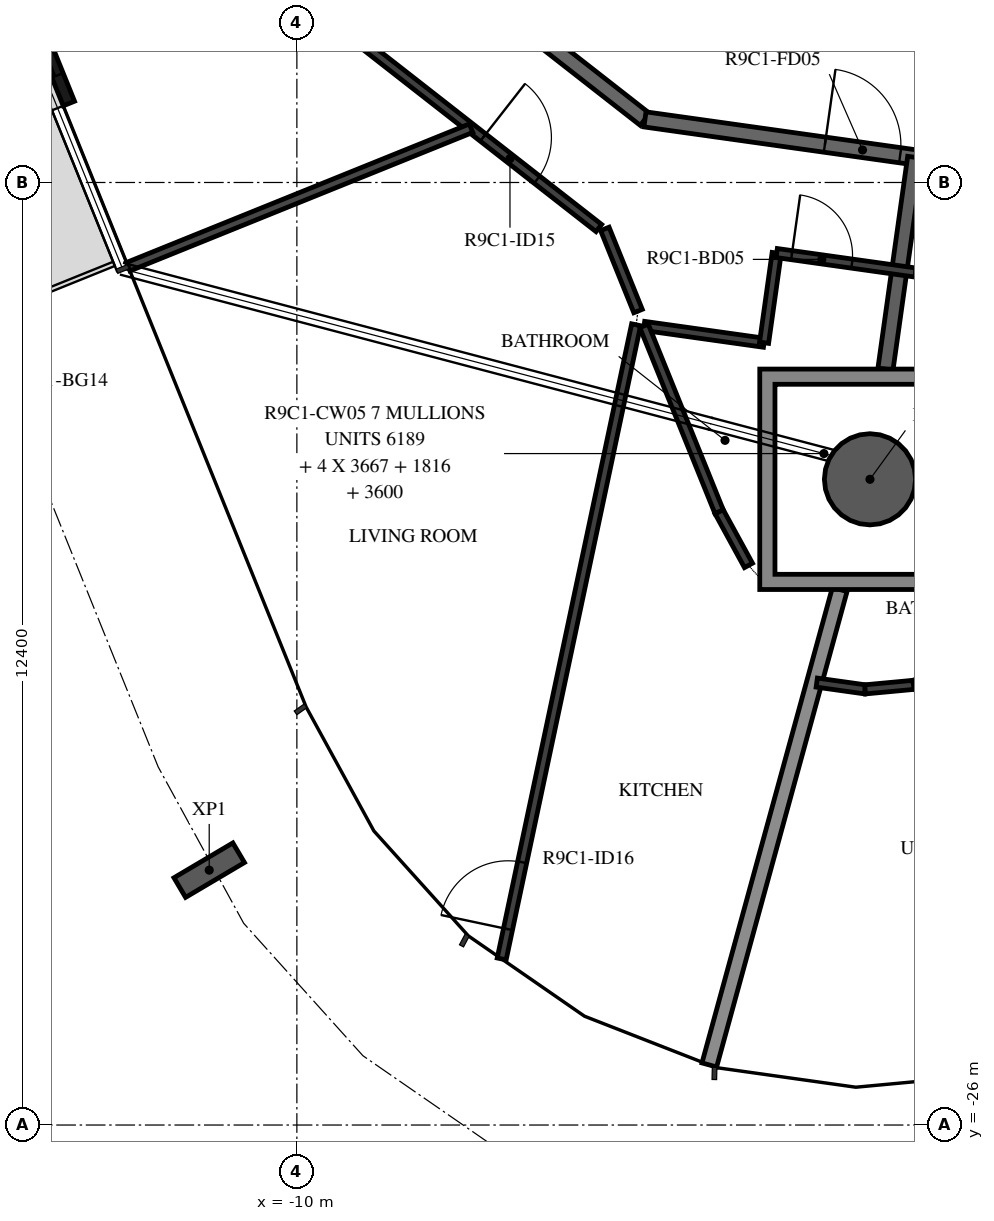
"""IFC4 building model, lengths in metres.
Left out: names, types, materials, properties, quantities, classifications, styles, units other than length and angle.
Written with IfcOpenShell. Run it as: python <this file> out.ifc"""

import sys

from ifc_helpers import new_model, si_unit, direction, frame, frame_2d, origin, origin_2d, place, context, subcontext, project, spatial, polyline, rectangle, hollow_circle, i_section, outline, extrude, element, fill, save


model = new_model("IFC4")
c1 = context("Model", 3, precision=1e-05, world=origin(), true_north=direction((0.0, 1.0)))
c2 = subcontext(c1, "Body", "Model", "MODEL_VIEW")
j1 = project(units=[si_unit("LENGTHUNIT", "METRE"), si_unit("PLANEANGLEUNIT", "RADIAN")], contexts=[c1])
p1 = place(None, origin())
s1 = spatial("IfcSite", under=j1, at=p1, CompositionType="ELEMENT")
p2 = place(p1, origin())
s2 = spatial("IfcBuilding", under=s1, at=p2, CompositionType="ELEMENT")
p3 = place(p2, frame((0.0, 0.0, 357.5)))
s3 = spatial("IfcBuildingStorey", under=s2, at=p3, CompositionType="ELEMENT", Elevation=357.5)
p4 = place(p3, frame((-2.46, -17.505, -0.38), z_axis=(0.0, 0.0, 1.0), x_axis=(1.0, 0.0, 0.0)))
e1 = element("IfcColumn", 1, at=p4, inside=s3, PredefinedType="COLUMN", context=c2, shape_type="SweptSolid", body=[
    extrude(hollow_circle(Radius=0.6, WallThickness=0.03, at=origin_2d()), origin(), (0.0, 0.0, 1.0), 3.5),
])
p5 = place(p3, frame((-11.153, -22.647, -0.38), z_axis=(0.0, 0.0, 1.0), x_axis=(-0.509114042361, 0.86069907161, 0.0)))
e2 = element("IfcColumn", 2, at=p5, inside=s3, PredefinedType="COLUMN", context=c2, shape_type="SweptSolid", body=[
    extrude(i_section(OverallWidth=0.3, OverallDepth=0.9, WebThickness=0.019, FlangeThickness=0.035, FilletRadius=0.03, at=origin_2d()), origin(), (0.0, 0.0, 1.0), 3.5),
])
p6 = place(p3, frame((-14.198, -9.594, 0.0), z_axis=(0.0, 0.0, 1.0), x_axis=(0.374624519695, -0.927176611678, 0.0)))
e3 = element("IfcWall", 3, at=p6, inside=s3, PredefinedType="STANDARD", context=c2, shape_type="SweptSolid", body=[
    extrude(rectangle(XDim=3.2, YDim=0.16, at=frame_2d((1.6, 0.0))), origin(), (0.0, 0.0, 1.0), 3.12),
])
p7 = place(p6, frame((0.4, 0.0, 0.0)))
e4 = element("IfcOpeningElement", 4, at=p7, cuts=e3, PredefinedType="OPENING", context=c2, shape_type="SweptSolid", body=[
    extrude(rectangle(XDim=2.4, YDim=2.4, at=frame_2d((1.2, 1.2))), frame((0.0, 0.09, 0.0), z_axis=(0.0, -1.0, 0.0), x_axis=(1.0, 0.0, 0.0)), (0.0, 0.0, 1.0), 0.18),
])
p8 = place(p3, frame((-11.079, -8.349, 0.0), z_axis=(0.0, 0.0, 1.0), x_axis=(0.78800478687, -0.615669112324, 0.0)))
e5 = element("IfcWall", 5, at=p8, inside=s3, PredefinedType="STANDARD", context=c2, shape_type="SweptSolid", body=[
    extrude(rectangle(XDim=7.181, YDim=0.2, at=frame_2d((3.591, 0.0))), origin(), (0.0, 0.0, 1.0), 3.12),
])
p9 = place(p3, frame((-5.42, -12.77, 0.0), z_axis=(0.0, 0.0, 1.0), x_axis=(0.990270565508, -0.139155334385, 0.0)))
e6 = element("IfcWall", 6, at=p9, inside=s3, PredefinedType="STANDARD", context=c2, shape_type="SweptSolid", body=[
    extrude(rectangle(XDim=7.181, YDim=0.2, at=frame_2d((3.59, 0.0))), origin(), (0.0, 0.0, 1.0), 3.12),
])
p10 = place(p9, frame((2.39, 0.0, 0.0)))
e7 = element("IfcOpeningElement", 7, at=p10, cuts=e6, PredefinedType="OPENING", context=c2, shape_type="SweptSolid", body=[
    extrude(rectangle(XDim=1.0, YDim=2.1, at=frame_2d((0.5, 1.05))), frame((0.0, 0.11, 0.0), z_axis=(0.0, -1.0, 0.0), x_axis=(1.0, 0.0, 0.0)), (0.0, 0.0, 1.0), 0.22),
])
p11 = place(p9, frame((4.091, 0.0, 0.0)))
e8 = element("IfcOpeningElement", 8, at=p11, cuts=e6, PredefinedType="OPENING", context=c2, shape_type="SweptSolid", body=[
    extrude(rectangle(XDim=1.0, YDim=2.1, at=frame_2d((0.5, 1.05))), frame((0.0, 0.11, 0.0), z_axis=(0.0, -1.0, 0.0), x_axis=(1.0, 0.0, 0.0)), (0.0, 0.0, 1.0), 0.22),
])
p12 = place(p3, frame((-2.256, -16.055, 0.0), z_axis=(0.0, 0.0, 1.0), x_axis=(0.139148428478, 0.990271535919, 0.0)))
e9 = element("IfcWall", 9, at=p12, inside=s3, PredefinedType="STANDARD", context=c2, shape_type="SweptSolid", body=[
    extrude(rectangle(XDim=2.812, YDim=0.2, at=frame_2d((1.406, 0.0))), origin(), (0.0, 0.0, 1.0), 3.12),
])
p13 = place(p3, frame((-4.574, -25.21, 0.0), z_axis=(0.0, 0.0, 1.0), x_axis=(0.264579024648, 0.964364007892, 0.0)))
e10 = element("IfcWall", 10, at=p13, inside=s3, PredefinedType="STANDARD", context=c2, shape_type="SweptSolid", body=[
    extrude(rectangle(XDim=6.486, YDim=0.2, at=frame_2d((3.243, 0.0))), origin(), (0.0, 0.0, 1.0), 2.73),
])
p14 = place(p3, frame((-12.319, -9.283, 0.0), z_axis=(0.0, 0.0, 1.0), x_axis=(0.788000268464, -0.61567489546, 0.0)))
e11 = element("IfcWall", 11, at=p14, inside=s3, PredefinedType="PARTITIONING", context=c2, shape_type="SweptSolid", body=[
    extrude(rectangle(XDim=7.985, YDim=0.12, at=frame_2d((3.992, 0.0))), origin(), (0.0, 0.0, 1.0), 3.12),
])
p15 = place(p14, frame((6.051, 0.0, 0.0)))
e12 = element("IfcOpeningElement", 12, at=p15, cuts=e11, PredefinedType="OPENING", context=c2, shape_type="SweptSolid", body=[
    extrude(rectangle(XDim=0.9, YDim=2.1, at=frame_2d((0.45, 1.05))), frame((0.0, 0.07, 0.0), z_axis=(0.0, -1.0, 0.0), x_axis=(1.0, 0.0, 0.0)), (0.0, 0.0, 1.0), 0.14),
])
p16 = place(p3, frame((-5.948, -14.21, 0.0), z_axis=(0.0, 0.0, 1.0), x_axis=(0.374601530156, -0.927185900241, 0.0)))
e13 = element("IfcWall", 13, at=p16, inside=s3, PredefinedType="PARTITIONING", context=c2, shape_type="SweptSolid", body=[
    extrude(rectangle(XDim=1.166, YDim=0.12, at=frame_2d((0.583, 0.0))), origin(), (0.0, 0.0, 1.0), 3.12),
])
p17 = place(p3, frame((-5.433, -15.487, 0.0), z_axis=(0.0, 0.0, 1.0), x_axis=(0.990268451053, -0.139170380644, 0.0)))
e14 = element("IfcWall", 14, at=p17, inside=s3, PredefinedType="PARTITIONING", context=c2, shape_type="SweptSolid", body=[
    extrude(rectangle(XDim=1.595, YDim=0.12, at=frame_2d((0.797, 0.0))), origin(), (0.0, 0.0, 1.0), 3.12),
])
p18 = place(p3, frame((-3.854, -15.708, 0.0), z_axis=(0.0, 0.0, 1.0), x_axis=(0.139298773474, 0.99025039849, 0.0)))
e15 = element("IfcWall", 15, at=p18, inside=s3, PredefinedType="PARTITIONING", context=c2, shape_type="SweptSolid", body=[
    extrude(rectangle(XDim=1.192, YDim=0.12, at=frame_2d((0.596, 0.0))), origin(), (0.0, 0.0, 1.0), 3.12),
])
p19 = place(p3, frame((-3.688, -14.528, 0.0), z_axis=(0.0, 0.0, 1.0), x_axis=(0.990273413633, -0.139135064782, 0.0)))
e16 = element("IfcWall", 16, at=p19, inside=s3, PredefinedType="PARTITIONING", context=c2, shape_type="SweptSolid", body=[
    extrude(rectangle(XDim=5.622, YDim=0.12, at=frame_2d((2.811, 0.0))), origin(), (0.0, 0.0, 1.0), 3.12),
])
p20 = place(p19, frame((0.2, 0.0, 0.0)))
e17 = element("IfcOpeningElement", 17, at=p20, cuts=e16, PredefinedType="OPENING", context=c2, shape_type="SweptSolid", body=[
    extrude(rectangle(XDim=0.8, YDim=2.1, at=frame_2d((0.4, 1.05))), frame((0.0, 0.07, 0.0), z_axis=(0.0, -1.0, 0.0), x_axis=(1.0, 0.0, 0.0)), (0.0, 0.0, 1.0), 0.14),
])
p21 = place(p19, frame((1.83, 0.0, 0.0)))
e18 = element("IfcOpeningElement", 18, at=p21, cuts=e16, PredefinedType="OPENING", context=c2, shape_type="SweptSolid", body=[
    extrude(rectangle(XDim=0.9, YDim=2.1, at=frame_2d((0.45, 1.05))), frame((0.0, 0.07, 0.0), z_axis=(0.0, -1.0, 0.0), x_axis=(1.0, 0.0, 0.0)), (0.0, 0.0, 1.0), 0.14),
])
p22 = place(p3, frame((-12.219, -14.708, 0.0), z_axis=(0.0, 0.0, 1.0), x_axis=(0.927176471086, 0.374624867655, 0.0)))
e19 = element("IfcWall", 19, at=p22, inside=s3, PredefinedType="PARTITIONING", context=c2, shape_type="SweptSolid", body=[
    extrude(rectangle(XDim=4.864, YDim=0.12, at=frame_2d((2.432, 0.0))), origin(), (0.0, 0.0, 1.0), 2.73),
])
p23 = place(p3, frame((-7.305, -23.815, 0.0), z_axis=(0.0, 0.0, 1.0), x_axis=(0.207366409306, 0.978263345062, 0.0)))
e20 = element("IfcWall", 20, at=p23, inside=s3, PredefinedType="PARTITIONING", context=c2, shape_type="SweptSolid", body=[
    extrude(rectangle(XDim=8.529, YDim=0.12, at=frame_2d((4.264, 0.0))), origin(), (0.0, 0.0, 1.0), 3.12),
])
p24 = place(p23, frame((0.4, 0.0, 0.0)))
e21 = element("IfcOpeningElement", 21, at=p24, cuts=e20, PredefinedType="OPENING", context=c2, shape_type="SweptSolid", body=[
    extrude(rectangle(XDim=0.9, YDim=2.1, at=frame_2d((0.45, 1.05))), frame((0.0, 0.07, 0.0), z_axis=(0.0, -1.0, 0.0), x_axis=(1.0, 0.0, 0.0)), (0.0, 0.0, 1.0), 0.14),
])
p25 = place(p3, frame((-4.059, -18.638, 0.0), z_axis=(0.0, 0.0, 1.0), x_axis=(-0.479488268542, 0.877548289458, 0.0)))
e22 = element("IfcWall", 22, at=p25, inside=s3, PredefinedType="PARTITIONING", context=c2, shape_type="SweptSolid", body=[
    extrude(rectangle(XDim=0.807, YDim=0.12, at=frame_2d((0.403, 0.0))), origin(), (0.0, 0.0, 1.0), 3.12),
])
p26 = place(p3, frame((-4.445, -17.93, 0.0), z_axis=(0.0, 0.0, 1.0), x_axis=(-0.374614676827, 0.927180588616, 0.0)))
e23 = element("IfcWall", 23, at=p26, inside=s3, PredefinedType="PARTITIONING", context=c2, shape_type="SweptSolid", body=[
    extrude(rectangle(XDim=2.635, YDim=0.12, at=frame_2d((1.318, 0.0))), origin(), (0.0, 0.0, 1.0), 3.12),
])
p27 = place(p3, frame((-3.16, -20.179, 0.0), z_axis=(0.0, 0.0, 1.0), x_axis=(0.990266409014, -0.139184910023, 0.0)))
e24 = element("IfcWall", 24, at=p27, inside=s3, PredefinedType="PARTITIONING", context=c2, shape_type="SweptSolid", body=[
    extrude(rectangle(XDim=0.642, YDim=0.12, at=frame_2d((0.321, 0.0))), origin(), (0.0, 0.0, 1.0), 3.12),
])
for number, where, z_axis, x_axis in (
    (25, (-2.524, -20.269, 0.0), (0.0, 0.0, 1.0), (0.996, 0.093, 0.0)),
    (26, (-1.885, -20.209, 0.0), (0.0, 0.0, 1.0), (0.947, 0.32, 0.0)),
):
    element("IfcWall", number, at=place(p3, frame(where, z_axis=z_axis, x_axis=x_axis)), inside=s3, PredefinedType="PARTITIONING", context=c2, shape_type="SweptSolid", body=[
        extrude(rectangle(XDim=0.642, YDim=0.12, at=frame_2d((0.321, 0.0))), origin(), (0.0, 0.0, 1.0), 3.12),
    ])
p28 = place(p3, origin())
e27 = element("IfcWall", 27, at=p28, inside=s3, PredefinedType="STANDARD", context=c2, shape_type="SweptSolid", body=[
    extrude(outline(polyline([(-1.01, -16.055), (-1.01, -18.955), (-3.91, -18.955), (-3.91, -16.055), (-1.01, -16.055)]), holes=[polyline([(-3.71, -18.755), (-1.21, -18.755), (-1.21, -16.255), (-3.71, -16.255), (-3.71, -18.755)])]), origin(), (0.0, 0.0, 1.0), 3.12),
])
p29 = place(p7, origin())
e28 = element("IfcDoor", 28, at=p29, inside=s3, OperationType="DOUBLE_DOOR_SLIDING", PredefinedType="DOOR", context=c2, shape_type="SweptSolid", body=[
    extrude(rectangle(XDim=2.4, YDim=2.4, at=frame_2d((1.2, 1.2))), frame((0.0, 0.025, 0.0), z_axis=(0.0, -1.0, 0.0), x_axis=(1.0, 0.0, 0.0)), (0.0, 0.0, 1.0), 0.05),
])
fill(e4, e28)
p30 = place(p10, origin())
e29 = element("IfcDoor", 29, at=p30, inside=s3, OperationType="SINGLE_SWING_RIGHT", PredefinedType="DOOR", context=c2, shape_type="SweptSolid", body=[
    extrude(rectangle(XDim=1.0, YDim=2.1, at=frame_2d((0.5, 1.05))), frame((0.0, 0.025, 0.0), z_axis=(0.0, -1.0, 0.0), x_axis=(1.0, 0.0, 0.0)), (0.0, 0.0, 1.0), 0.05),
])
fill(e7, e29)
p31 = place(p15, origin())
e30 = element("IfcDoor", 30, at=p31, inside=s3, OperationType="SINGLE_SWING_RIGHT", PredefinedType="DOOR", context=c2, shape_type="SweptSolid", body=[
    extrude(rectangle(XDim=0.9, YDim=2.1, at=frame_2d((0.45, 1.05))), frame((0.0, 0.025, 0.0), z_axis=(0.0, -1.0, 0.0), x_axis=(1.0, 0.0, 0.0)), (0.0, 0.0, 1.0), 0.05),
])
fill(e12, e30)
p32 = place(p20, origin())
e31 = element("IfcDoor", 31, at=p32, inside=s3, OperationType="SINGLE_SWING_RIGHT", PredefinedType="DOOR", context=c2, shape_type="SweptSolid", body=[
    extrude(rectangle(XDim=0.8, YDim=2.1, at=frame_2d((0.4, 1.05))), frame((0.0, 0.025, 0.0), z_axis=(0.0, -1.0, 0.0), x_axis=(1.0, 0.0, 0.0)), (0.0, 0.0, 1.0), 0.05),
])
fill(e17, e31)
p33 = place(p24, origin())
e32 = element("IfcDoor", 32, at=p33, inside=s3, OperationType="SINGLE_SWING_RIGHT", PredefinedType="DOOR", context=c2, shape_type="SweptSolid", body=[
    extrude(rectangle(XDim=0.9, YDim=2.1, at=frame_2d((0.45, 1.05))), frame((0.0, 0.025, 0.0), z_axis=(0.0, -1.0, 0.0), x_axis=(1.0, 0.0, 0.0)), (0.0, 0.0, 1.0), 0.05),
])
fill(e21, e32)
p34 = place(p21, origin())
e33 = element("IfcDoor", 33, at=p34, inside=s3, OperationType="SINGLE_SWING_RIGHT", PredefinedType="DOOR", context=c2, shape_type="SweptSolid", body=[
    extrude(rectangle(XDim=0.9, YDim=2.1, at=frame_2d((0.45, 1.05))), frame((0.0, 0.025, 0.0), z_axis=(0.0, -1.0, 0.0), x_axis=(1.0, 0.0, 0.0)), (0.0, 0.0, 1.0), 0.05),
])
fill(e18, e33)
save(model, sys.argv[1])
